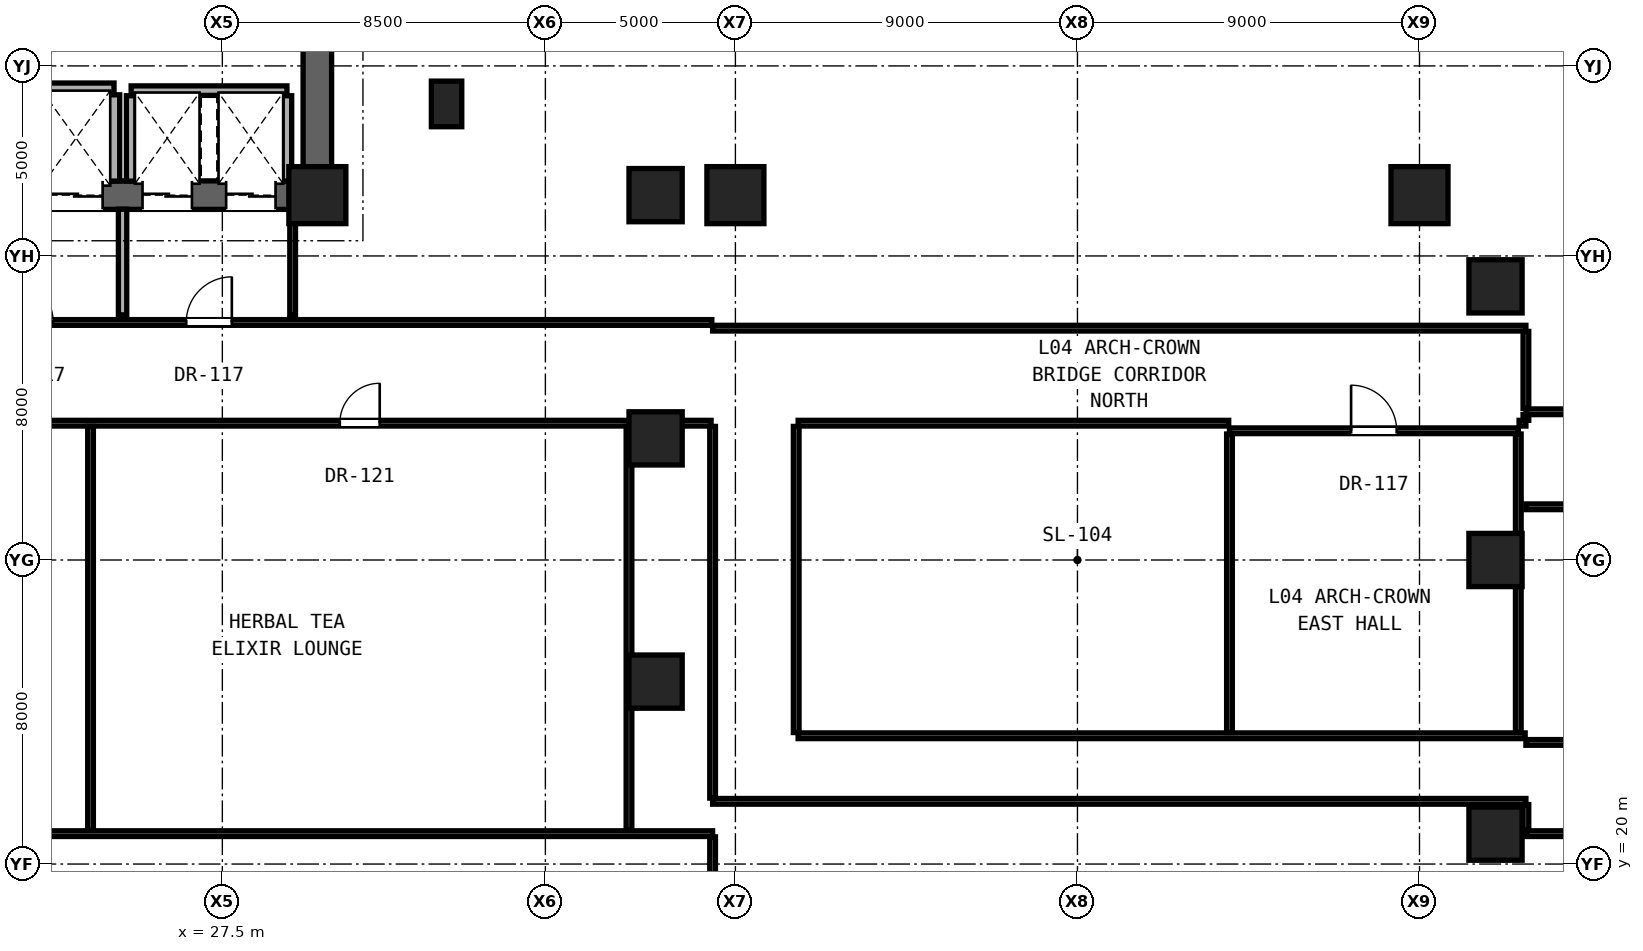
"""IFC4 building model, lengths in metres.
Left out: names, types, materials, properties, quantities, classifications, styles, units other than length and angle.
Written with IfcOpenShell. Run it as: python <this file> out.ifc"""

import sys

from ifc_helpers import new_model, si_unit, direction, frame, frame_2d, origin, origin_2d, place, context, subcontext, project, spatial, rectangle, hollow_rectangle, extrude, element, fill, save


model = new_model("IFC4")
c1 = context("Model", 3, precision=1e-05, world=origin(), true_north=direction((0.0, 1.0)))
c2 = subcontext(c1, "Body", "Model", "MODEL_VIEW")
j1 = project(units=[si_unit("LENGTHUNIT", "METRE"), si_unit("PLANEANGLEUNIT", "RADIAN")], contexts=[c1])
p1 = place(None, origin())
s1 = spatial("IfcSite", under=j1, at=p1, CompositionType="ELEMENT")
p2 = place(p1, origin())
s2 = spatial("IfcBuilding", under=s1, at=p2, CompositionType="ELEMENT")
p3 = place(p2, frame((0.0, 0.0, 18.1)))
s3 = spatial("IfcBuildingStorey", under=s2, at=p3, CompositionType="ELEMENT", Elevation=18.1)
p4 = place(p3, frame((30.0, 37.6, 0.0), z_axis=(0.0, 0.0, 1.0), x_axis=(1.0, 0.0, 0.0)))
e1 = element("IfcColumn", 1, at=p4, inside=s3, PredefinedType="COLUMN", context=c2, shape_type="SweptSolid", body=[
    extrude(rectangle(XDim=1.5, YDim=1.5, at=origin_2d()), origin(), (0.0, 0.0, 1.0), 4.3),
])
for number, where, z_axis, x_axis in (
    (2, (38.9, 24.8, 0.0), (0.0, 0.0, 1.0), (1.0, 0.0, 0.0)),
    (3, (38.9, 31.2, 0.0), (0.0, 0.0, 1.0), (1.0, 0.0, 0.0)),
    (4, (38.9, 37.6, 0.0), (0.0, 0.0, 1.0), (1.0, 0.0, 0.0)),
):
    element("IfcColumn", number, at=place(p3, frame(where, z_axis=z_axis, x_axis=x_axis)), inside=s3, PredefinedType="COLUMN", context=c2, shape_type="SweptSolid", body=[
        extrude(hollow_rectangle(XDim=1.4, YDim=1.4, WallThickness=0.08, at=origin_2d()), origin(), (0.0, 0.0, 1.0), 4.3),
    ])
p5 = place(p3, frame((33.4, 40.0, 0.0), z_axis=(0.0, 0.0, 1.0), x_axis=(1.0, 0.0, 0.0)))
e5 = element("IfcColumn", 5, at=p5, inside=s3, PredefinedType="PILASTER", context=c2, shape_type="SweptSolid", body=[
    extrude(rectangle(XDim=0.8, YDim=1.2, at=origin_2d()), origin(), (0.0, 0.0, 1.0), 4.3),
])
p6 = place(p3, frame((30.0, 37.6, 0.0), z_axis=(0.0, 0.0, 1.0), x_axis=(0.0, 1.0, 0.0)))
e6 = element("IfcWall", 6, at=p6, inside=s3, PredefinedType="SHEAR", context=c2, shape_type="SweptSolid", body=[
    extrude(rectangle(XDim=6.0, YDim=0.75, at=frame_2d((3.0, 0.0))), origin(), (0.0, 0.0, 1.0), 3.65),
])
p7 = place(p3, frame((11.0, 37.6, 0.0), z_axis=(0.0, 0.0, 1.0), x_axis=(1.0, 0.0, 0.0)))
e7 = element("IfcWall", 7, at=p7, inside=s3, PredefinedType="SHEAR", context=c2, shape_type="SweptSolid", body=[
    extrude(rectangle(XDim=19.0, YDim=0.75, at=frame_2d((9.5, 0.0))), origin(), (0.0, 0.0, 1.0), 3.65),
])
p8 = place(p7, frame((1.07, 0.0, 0.0)))
e8 = element("IfcOpeningElement", 8, at=p8, cuts=e7, PredefinedType="OPENING", context=c2, shape_type="SweptSolid", body=[
    extrude(rectangle(XDim=1.15, YDim=2.2, at=frame_2d((0.575, 1.1))), frame((0.0, 0.385, 0.0), z_axis=(0.0, -1.0, 0.0), x_axis=(1.0, 0.0, 0.0)), (0.0, 0.0, 1.0), 0.77),
])
p9 = place(p7, frame((9.55, 0.0, 0.0)))
e9 = element("IfcOpeningElement", 9, at=p9, cuts=e7, PredefinedType="OPENING", context=c2, shape_type="SweptSolid", body=[
    extrude(rectangle(XDim=1.4, YDim=2.35, at=frame_2d((0.7, 1.175))), frame((0.0, 0.385, 0.0), z_axis=(0.0, -1.0, 0.0), x_axis=(1.0, 0.0, 0.0)), (0.0, 0.0, 1.0), 0.77),
])
p10 = place(p7, frame((11.95, 0.0, 0.0)))
e10 = element("IfcOpeningElement", 10, at=p10, cuts=e7, PredefinedType="OPENING", context=c2, shape_type="SweptSolid", body=[
    extrude(rectangle(XDim=1.4, YDim=2.35, at=frame_2d((0.7, 1.175))), frame((0.0, 0.385, 0.0), z_axis=(0.0, -1.0, 0.0), x_axis=(1.0, 0.0, 0.0)), (0.0, 0.0, 1.0), 0.77),
])
p11 = place(p7, frame((14.4, 0.0, 0.0)))
e11 = element("IfcOpeningElement", 11, at=p11, cuts=e7, PredefinedType="OPENING", context=c2, shape_type="SweptSolid", body=[
    extrude(rectangle(XDim=1.3, YDim=2.3, at=frame_2d((0.65, 1.15))), frame((0.0, 0.385, 0.0), z_axis=(0.0, -1.0, 0.0), x_axis=(1.0, 0.0, 0.0)), (0.0, 0.0, 1.0), 0.77),
])
p12 = place(p7, frame((16.6, 0.0, 0.0)))
e12 = element("IfcOpeningElement", 12, at=p12, cuts=e7, PredefinedType="OPENING", context=c2, shape_type="SweptSolid", body=[
    extrude(rectangle(XDim=1.3, YDim=2.3, at=frame_2d((0.65, 1.15))), frame((0.0, 0.385, 0.0), z_axis=(0.0, -1.0, 0.0), x_axis=(1.0, 0.0, 0.0)), (0.0, 0.0, 1.0), 0.77),
])
for number, where, z_axis, x_axis in (
    (13, (61.0, 20.8, 0.0), (0.0, 0.0, 1.0), (1.0, 0.0, 0.0)),
    (14, (61.0, 28.0, 0.0), (0.0, 0.0, 1.0), (1.0, 0.0, 0.0)),
    (15, (61.0, 35.2, 0.0), (0.0, 0.0, 1.0), (1.0, 0.0, 0.0)),
):
    element("IfcColumn", number, at=place(p3, frame(where, z_axis=z_axis, x_axis=x_axis)), inside=s3, PredefinedType="COLUMN", context=c2, shape_type="SweptSolid", body=[
        extrude(hollow_rectangle(XDim=1.4, YDim=1.4, WallThickness=0.08, at=origin_2d()), origin(), (0.0, 0.0, 1.0), 4.3),
    ])
for number, where, z_axis, x_axis in (
    (16, (41.0, 37.6, 0.0), (0.0, 0.0, 1.0), (1.0, 0.0, 0.0)),
    (17, (59.0, 37.6, 0.0), (0.0, 0.0, 1.0), (1.0, 0.0, 0.0)),
):
    element("IfcColumn", number, at=place(p3, frame(where, z_axis=z_axis, x_axis=x_axis)), inside=s3, PredefinedType="COLUMN", context=c2, shape_type="SweptSolid", body=[
        extrude(rectangle(XDim=1.5, YDim=1.5, at=origin_2d()), origin(), (0.0, 0.0, 1.0), 4.3),
    ])
p13 = place(p3, frame((10.05, 20.8, 0.0), z_axis=(0.0, 0.0, 1.0), x_axis=(1.0, 0.0, 0.0)))
e18 = element("IfcWall", 18, at=p13, inside=s3, PredefinedType="PARTITIONING", context=c2, shape_type="SweptSolid", body=[
    extrude(rectangle(XDim=30.35, YDim=0.15, at=frame_2d((15.175, 0.0))), origin(), (0.0, 0.0, 1.0), 2.602),
])
p14 = place(p13, frame((0.995, 0.0, 0.0)))
e19 = element("IfcOpeningElement", 19, at=p14, cuts=e18, PredefinedType="OPENING", context=c2, shape_type="SweptSolid", body=[
    extrude(rectangle(XDim=0.9, YDim=2.1, at=frame_2d((0.45, 1.05))), frame((0.0, 0.085, 0.0), z_axis=(0.0, -1.0, 0.0), x_axis=(1.0, 0.0, 0.0)), (0.0, 0.0, 1.0), 0.17),
])
p15 = place(p13, frame((7.891, 0.0, 0.0)))
e20 = element("IfcOpeningElement", 20, at=p15, cuts=e18, PredefinedType="OPENING", context=c2, shape_type="SweptSolid", body=[
    extrude(rectangle(XDim=1.05, YDim=2.2, at=frame_2d((0.525, 1.1))), frame((0.0, 0.085, 0.0), z_axis=(0.0, -1.0, 0.0), x_axis=(1.0, 0.0, 0.0)), (0.0, 0.0, 1.0), 0.17),
])
p16 = place(p3, frame((61.8, 20.8, 0.0), z_axis=(0.0, 0.0, 1.0), x_axis=(1.0, 0.0, 0.0)))
e21 = element("IfcWall", 21, at=p16, inside=s3, PredefinedType="PARTITIONING", context=c2, shape_type="SweptSolid", body=[
    extrude(rectangle(XDim=5.83, YDim=0.15, at=frame_2d((2.915, 0.0))), origin(), (0.0, 0.0, 1.0), 2.542),
])
p17 = place(p3, frame((40.4, 21.65, 0.0), z_axis=(0.0, 0.0, 1.0), x_axis=(1.0, 0.0, 0.0)))
e22 = element("IfcWall", 22, at=p17, inside=s3, PredefinedType="PARTITIONING", context=c2, shape_type="SweptSolid", body=[
    extrude(rectangle(XDim=21.4, YDim=0.15, at=frame_2d((10.7, 0.0))), origin(), (0.0, 0.0, 1.0), 2.602),
])
p18 = place(p3, frame((61.8, 23.2, 0.0), z_axis=(0.0, 0.0, 1.0), x_axis=(1.0, 0.0, 0.0)))
e23 = element("IfcWall", 23, at=p18, inside=s3, PredefinedType="PARTITIONING", context=c2, shape_type="SweptSolid", body=[
    extrude(rectangle(XDim=29.15, YDim=0.15, at=frame_2d((14.575, 0.0))), origin(), (0.0, 0.0, 1.0), 2.715),
])
p19 = place(p18, frame((6.225, 0.0, 0.0)))
e24 = element("IfcOpeningElement", 24, at=p19, cuts=e23, PredefinedType="OPENING", context=c2, shape_type="SweptSolid", body=[
    extrude(rectangle(XDim=0.9, YDim=2.1, at=frame_2d((0.45, 1.05))), frame((0.0, 0.085, 0.0), z_axis=(0.0, -1.0, 0.0), x_axis=(1.0, 0.0, 0.0)), (0.0, 0.0, 1.0), 0.17),
])
p20 = place(p18, frame((15.15, 0.0, 0.0)))
e25 = element("IfcOpeningElement", 25, at=p20, cuts=e23, PredefinedType="OPENING", context=c2, shape_type="SweptSolid", body=[
    extrude(rectangle(XDim=1.05, YDim=2.2, at=frame_2d((0.525, 1.1))), frame((0.0, 0.085, 0.0), z_axis=(0.0, -1.0, 0.0), x_axis=(1.0, 0.0, 0.0)), (0.0, 0.0, 1.0), 0.17),
])
p21 = place(p3, frame((42.65, 23.375, 0.0), z_axis=(0.0, 0.0, 1.0), x_axis=(1.0, 0.0, 0.0)))
e26 = element("IfcWall", 26, at=p21, inside=s3, PredefinedType="PARTITIONING", context=c2, shape_type="SweptSolid", body=[
    extrude(rectangle(XDim=19.13, YDim=0.15, at=frame_2d((9.565, 0.0))), origin(), (0.0, 0.0, 1.0), 2.602),
])
p22 = place(p3, frame((61.8, 29.4, 0.0), z_axis=(0.0, 0.0, 1.0), x_axis=(1.0, 0.0, 0.0)))
e27 = element("IfcWall", 27, at=p22, inside=s3, PredefinedType="PARTITIONING", context=c2, shape_type="SweptSolid", body=[
    extrude(rectangle(XDim=7.93, YDim=0.15, at=frame_2d((3.965, 0.0))), origin(), (0.0, 0.0, 1.0), 2.715),
])
p23 = place(p3, frame((54.0, 31.4, 0.0), z_axis=(0.0, 0.0, 1.0), x_axis=(1.0, 0.0, 0.0)))
e28 = element("IfcWall", 28, at=p23, inside=s3, PredefinedType="PARTITIONING", context=c2, shape_type="SweptSolid", body=[
    extrude(rectangle(XDim=7.6, YDim=0.15, at=frame_2d((3.8, 0.0))), origin(), (0.0, 0.0, 1.0), 2.602),
])
p24 = place(p23, frame((3.2, 0.0, 0.0)))
e29 = element("IfcOpeningElement", 29, at=p24, cuts=e28, PredefinedType="OPENING", context=c2, shape_type="SweptSolid", body=[
    extrude(rectangle(XDim=1.2, YDim=2.25, at=frame_2d((0.6, 1.125))), frame((0.0, 0.085, 0.0), z_axis=(0.0, -1.0, 0.0), x_axis=(1.0, 0.0, 0.0)), (0.0, 0.0, 1.0), 0.17),
])
p25 = place(p3, frame((10.05, 31.6, 0.0), z_axis=(0.0, 0.0, 1.0), x_axis=(1.0, 0.0, 0.0)))
e30 = element("IfcWall", 30, at=p25, inside=s3, PredefinedType="PARTITIONING", context=c2, shape_type="SweptSolid", body=[
    extrude(rectangle(XDim=30.31, YDim=0.15, at=frame_2d((15.155, 0.0))), origin(), (0.0, 0.0, 1.0), 2.602),
])
p26 = place(p25, frame((20.541, 0.0, 0.0)))
e31 = element("IfcOpeningElement", 31, at=p26, cuts=e30, PredefinedType="OPENING", context=c2, shape_type="SweptSolid", body=[
    extrude(rectangle(XDim=1.05, YDim=2.2, at=frame_2d((0.525, 1.1))), frame((0.0, 0.085, 0.0), z_axis=(0.0, -1.0, 0.0), x_axis=(1.0, 0.0, 0.0)), (0.0, 0.0, 1.0), 0.17),
])
p27 = place(p3, frame((42.65, 31.6, 0.0), z_axis=(0.0, 0.0, 1.0), x_axis=(1.0, 0.0, 0.0)))
e32 = element("IfcWall", 32, at=p27, inside=s3, PredefinedType="PARTITIONING", context=c2, shape_type="SweptSolid", body=[
    extrude(rectangle(XDim=11.33, YDim=0.15, at=frame_2d((5.665, 0.0))), origin(), (0.0, 0.0, 1.0), 3.65),
])
p28 = place(p3, frame((61.62, 31.6, 0.0), z_axis=(0.0, 0.0, 1.0), x_axis=(1.0, 0.0, 0.0)))
e33 = element("IfcWall", 33, at=p28, inside=s3, PredefinedType="PARTITIONING", context=c2, shape_type="SweptSolid", body=[
    extrude(rectangle(XDim=0.18, YDim=0.15, at=frame_2d((0.09, 0.0))), origin(), (0.0, 0.0, 1.0), 3.65),
])
p29 = place(p3, frame((61.8, 31.9, 0.0), z_axis=(0.0, 0.0, 1.0), x_axis=(1.0, 0.0, 0.0)))
e34 = element("IfcWall", 34, at=p29, inside=s3, PredefinedType="PARTITIONING", context=c2, shape_type="SweptSolid", body=[
    extrude(rectangle(XDim=5.35, YDim=0.15, at=frame_2d((2.675, 0.0))), origin(), (0.0, 0.0, 1.0), 3.65),
])
p30 = place(p3, frame((40.4, 34.1, 0.0), z_axis=(0.0, 0.0, 1.0), x_axis=(1.0, 0.0, 0.0)))
e35 = element("IfcWall", 35, at=p30, inside=s3, PredefinedType="PARTITIONING", context=c2, shape_type="SweptSolid", body=[
    extrude(rectangle(XDim=21.4, YDim=0.15, at=frame_2d((10.7, 0.0))), origin(), (0.0, 0.0, 1.0), 2.602),
])
p31 = place(p3, frame((16.65, 34.25, 0.0), z_axis=(0.0, 0.0, 1.0), x_axis=(1.0, 0.0, 0.0)))
e36 = element("IfcWall", 36, at=p31, inside=s3, PredefinedType="PARTITIONING", context=c2, shape_type="SweptSolid", body=[
    extrude(rectangle(XDim=23.73, YDim=0.15, at=frame_2d((11.865, 0.0))), origin(), (0.0, 0.0, 1.0), 2.602),
])
p32 = place(p31, frame((5.2, 0.0, 0.0)))
e37 = element("IfcOpeningElement", 37, at=p32, cuts=e36, PredefinedType="OPENING", context=c2, shape_type="SweptSolid", body=[
    extrude(rectangle(XDim=1.2, YDim=2.25, at=frame_2d((0.6, 1.125))), frame((0.0, 0.085, 0.0), z_axis=(0.0, -1.0, 0.0), x_axis=(1.0, 0.0, 0.0)), (0.0, 0.0, 1.0), 0.17),
])
p33 = place(p31, frame((9.9, 0.0, 0.0)))
e38 = element("IfcOpeningElement", 38, at=p33, cuts=e36, PredefinedType="OPENING", context=c2, shape_type="SweptSolid", body=[
    extrude(rectangle(XDim=1.2, YDim=2.25, at=frame_2d((0.6, 1.125))), frame((0.0, 0.085, 0.0), z_axis=(0.0, -1.0, 0.0), x_axis=(1.0, 0.0, 0.0)), (0.0, 0.0, 1.0), 0.17),
])
p34 = place(p3, frame((25.1, 40.35, 0.0), z_axis=(0.0, 0.0, 1.0), x_axis=(1.0, 0.0, 0.0)))
e39 = element("IfcWall", 39, at=p34, inside=s3, PredefinedType="SOLIDWALL", context=c2, shape_type="SweptSolid", body=[
    extrude(rectangle(XDim=4.1, YDim=0.25, at=frame_2d((2.05, 0.0))), origin(), (0.0, 0.0, 1.0), 3.65),
])
p35 = place(p3, frame((20.25, 40.4, 0.0), z_axis=(0.0, 0.0, 1.0), x_axis=(1.0, 0.0, 0.0)))
e40 = element("IfcWall", 40, at=p35, inside=s3, PredefinedType="SOLIDWALL", context=c2, shape_type="SweptSolid", body=[
    extrude(rectangle(XDim=4.4, YDim=0.3, at=frame_2d((2.2, 0.0))), origin(), (0.0, 0.0, 1.0), 3.65),
])
p36 = place(p3, frame((24.032, 20.885, 0.0), z_axis=(0.0, 0.0, 1.0), x_axis=(0.0, 1.0, 0.0)))
e41 = element("IfcWall", 41, at=p36, inside=s3, PredefinedType="PARTITIONING", context=c2, shape_type="SweptSolid", body=[
    extrude(rectangle(XDim=10.63, YDim=0.15, at=frame_2d((5.315, 0.0))), origin(), (0.0, 0.0, 1.0), 2.602),
])
p37 = place(p3, frame((24.65, 37.97, 0.0), z_axis=(0.0, 0.0, 1.0), x_axis=(0.0, 1.0, 0.0)))
e42 = element("IfcWall", 42, at=p37, inside=s3, PredefinedType="SOLIDWALL", context=c2, shape_type="SweptSolid", body=[
    extrude(rectangle(XDim=2.27, YDim=0.3, at=frame_2d((1.135, 0.0))), origin(), (0.0, 0.0, 1.0), 3.65),
])
p38 = place(p3, frame((24.875, 34.45, 0.0), z_axis=(0.0, 0.0, 1.0), x_axis=(0.0, 1.0, 0.0)))
e43 = element("IfcWall", 43, at=p38, inside=s3, PredefinedType="SOLIDWALL", context=c2, shape_type="SweptSolid", body=[
    extrude(rectangle(XDim=2.78, YDim=0.22, at=frame_2d((1.39, 0.0))), origin(), (0.0, 0.0, 1.0), 3.65),
])
p39 = place(p3, frame((25.1, 37.97, 0.0), z_axis=(0.0, 0.0, 1.0), x_axis=(0.0, 1.0, 0.0)))
e44 = element("IfcWall", 44, at=p39, inside=s3, PredefinedType="SOLIDWALL", context=c2, shape_type="SweptSolid", body=[
    extrude(rectangle(XDim=2.245, YDim=0.25, at=frame_2d((1.123, 0.0))), origin(), (0.0, 0.0, 1.0), 3.65),
])
p40 = place(p3, frame((29.35, 34.45, 0.0), z_axis=(0.0, 0.0, 1.0), x_axis=(0.0, 1.0, 0.0)))
e45 = element("IfcWall", 45, at=p40, inside=s3, PredefinedType="PARTITIONING", context=c2, shape_type="SweptSolid", body=[
    extrude(rectangle(XDim=2.78, YDim=0.15, at=frame_2d((1.39, 0.0))), origin(), (0.0, 0.0, 1.0), 3.65),
])
p41 = place(p3, frame((29.2, 37.97, 0.0), z_axis=(0.0, 0.0, 1.0), x_axis=(0.0, 1.0, 0.0)))
e46 = element("IfcWall", 46, at=p41, inside=s3, PredefinedType="SOLIDWALL", context=c2, shape_type="SweptSolid", body=[
    extrude(rectangle(XDim=2.245, YDim=0.25, at=frame_2d((1.123, 0.0))), origin(), (0.0, 0.0, 1.0), 3.65),
])
p42 = place(p3, frame((38.2, 20.885, 0.0), z_axis=(0.0, 0.0, 1.0), x_axis=(0.0, 1.0, 0.0)))
e47 = element("IfcWall", 47, at=p42, inside=s3, PredefinedType="PARTITIONING", context=c2, shape_type="SweptSolid", body=[
    extrude(rectangle(XDim=10.63, YDim=0.15, at=frame_2d((5.315, 0.0))), origin(), (0.0, 0.0, 1.0), 2.869),
])
p43 = place(p3, frame((40.4, 18.485, 0.0), z_axis=(0.0, 0.0, 1.0), x_axis=(0.0, 1.0, 0.0)))
e48 = element("IfcWall", 48, at=p43, inside=s3, PredefinedType="PARTITIONING", context=c2, shape_type="SweptSolid", body=[
    extrude(rectangle(XDim=2.23, YDim=0.15, at=frame_2d((1.115, 0.0))), origin(), (0.0, 0.0, 1.0), 2.694),
])
p44 = place(p3, frame((40.4, 21.735, 0.0), z_axis=(0.0, 0.0, 1.0), x_axis=(0.0, 1.0, 0.0)))
e49 = element("IfcWall", 49, at=p44, inside=s3, PredefinedType="PARTITIONING", context=c2, shape_type="SweptSolid", body=[
    extrude(rectangle(XDim=9.78, YDim=0.15, at=frame_2d((4.89, 0.0))), origin(), (0.0, 0.0, 1.0), 3.65),
])
p45 = place(p3, frame((42.6, 23.46, 0.0), z_axis=(0.0, 0.0, 1.0), x_axis=(0.0, 1.0, 0.0)))
e50 = element("IfcWall", 50, at=p45, inside=s3, PredefinedType="PARTITIONING", context=c2, shape_type="SweptSolid", body=[
    extrude(rectangle(XDim=8.055, YDim=0.15, at=frame_2d((4.027, 0.0))), origin(), (0.0, 0.0, 1.0), 3.65),
])
p46 = place(p3, frame((54.0, 23.46, 0.0), z_axis=(0.0, 0.0, 1.0), x_axis=(0.0, 1.0, 0.0)))
e51 = element("IfcWall", 51, at=p46, inside=s3, PredefinedType="PARTITIONING", context=c2, shape_type="SweptSolid", body=[
    extrude(rectangle(XDim=7.855, YDim=0.15, at=frame_2d((3.927, 0.0))), origin(), (0.0, 0.0, 1.0), 3.65),
])
p47 = place(p3, frame((61.6, 23.46, 0.0), z_axis=(0.0, 0.0, 1.0), x_axis=(0.0, 1.0, 0.0)))
e52 = element("IfcWall", 52, at=p47, inside=s3, PredefinedType="PARTITIONING", context=c2, shape_type="SweptSolid", body=[
    extrude(rectangle(XDim=7.855, YDim=0.15, at=frame_2d((3.927, 0.0))), origin(), (0.0, 0.0, 1.0), 2.869),
])
p48 = place(p3, frame((61.8, 20.885, 0.0), z_axis=(0.0, 0.0, 1.0), x_axis=(0.0, 1.0, 0.0)))
e53 = element("IfcWall", 53, at=p48, inside=s3, PredefinedType="PARTITIONING", context=c2, shape_type="SweptSolid", body=[
    extrude(rectangle(XDim=0.68, YDim=0.15, at=frame_2d((0.34, 0.0))), origin(), (0.0, 0.0, 1.0), 2.542),
])
p49 = place(p3, frame((61.8, 31.675, 0.0), z_axis=(0.0, 0.0, 1.0), x_axis=(0.0, 1.0, 0.0)))
e54 = element("IfcWall", 54, at=p49, inside=s3, PredefinedType="PARTITIONING", context=c2, shape_type="SweptSolid", body=[
    extrude(rectangle(XDim=0.15, YDim=0.15, at=frame_2d((0.075, 0.0))), origin(), (0.0, 0.0, 1.0), 3.65),
])
p50 = place(p3, frame((61.8, 31.985, 0.0), z_axis=(0.0, 0.0, 1.0), x_axis=(0.0, 1.0, 0.0)))
e55 = element("IfcWall", 55, at=p50, inside=s3, PredefinedType="PARTITIONING", context=c2, shape_type="SweptSolid", body=[
    extrude(rectangle(XDim=2.03, YDim=0.15, at=frame_2d((1.015, 0.0))), origin(), (0.0, 0.0, 1.0), 3.65),
])
p51 = place(p32, origin())
e56 = element("IfcDoor", 56, at=p51, inside=s3, OperationType="SINGLE_SWING_LEFT", PredefinedType="DOOR", context=c2, shape_type="SweptSolid", body=[
    extrude(rectangle(XDim=1.2, YDim=2.25, at=frame_2d((0.6, 1.125))), frame((0.0, 0.025, 0.0), z_axis=(0.0, -1.0, 0.0), x_axis=(1.0, 0.0, 0.0)), (0.0, 0.0, 1.0), 0.05),
])
fill(e37, e56)
p52 = place(p33, origin())
e57 = element("IfcDoor", 57, at=p52, inside=s3, OperationType="SINGLE_SWING_RIGHT", PredefinedType="DOOR", context=c2, shape_type="SweptSolid", body=[
    extrude(rectangle(XDim=1.2, YDim=2.25, at=frame_2d((0.6, 1.125))), frame((0.0, 0.025, 0.0), z_axis=(0.0, -1.0, 0.0), x_axis=(1.0, 0.0, 0.0)), (0.0, 0.0, 1.0), 0.05),
])
fill(e38, e57)
p53 = place(p26, origin())
e58 = element("IfcDoor", 58, at=p53, inside=s3, OperationType="SINGLE_SWING_RIGHT", PredefinedType="DOOR", context=c2, shape_type="SweptSolid", body=[
    extrude(rectangle(XDim=1.05, YDim=2.2, at=frame_2d((0.525, 1.1))), frame((0.0, 0.025, 0.0), z_axis=(0.0, -1.0, 0.0), x_axis=(1.0, 0.0, 0.0)), (0.0, 0.0, 1.0), 0.05),
])
fill(e31, e58)
p54 = place(p24, origin())
e59 = element("IfcDoor", 59, at=p54, inside=s3, OperationType="SINGLE_SWING_LEFT", PredefinedType="DOOR", context=c2, shape_type="SweptSolid", body=[
    extrude(rectangle(XDim=1.2, YDim=2.25, at=frame_2d((0.6, 1.125))), frame((0.0, 0.025, 0.0), z_axis=(0.0, -1.0, 0.0), x_axis=(1.0, 0.0, 0.0)), (0.0, 0.0, 1.0), 0.05),
])
fill(e29, e59)
p55 = place(p10, origin())
e60 = element("IfcDoor", 60, at=p55, inside=s3, OperationType="DOUBLE_DOOR_SLIDING", PredefinedType="DOOR", context=c2, shape_type="SweptSolid", body=[
    extrude(rectangle(XDim=1.4, YDim=2.35, at=frame_2d((0.7, 1.175))), frame((0.0, 0.025, 0.0), z_axis=(0.0, -1.0, 0.0), x_axis=(1.0, 0.0, 0.0)), (0.0, 0.0, 1.0), 0.05),
])
fill(e10, e60)
p56 = place(p11, origin())
e61 = element("IfcDoor", 61, at=p56, inside=s3, OperationType="DOUBLE_DOOR_SLIDING", PredefinedType="DOOR", context=c2, shape_type="SweptSolid", body=[
    extrude(rectangle(XDim=1.3, YDim=2.3, at=frame_2d((0.65, 1.15))), frame((0.0, 0.025, 0.0), z_axis=(0.0, -1.0, 0.0), x_axis=(1.0, 0.0, 0.0)), (0.0, 0.0, 1.0), 0.05),
])
fill(e11, e61)
p57 = place(p12, origin())
e62 = element("IfcDoor", 62, at=p57, inside=s3, OperationType="DOUBLE_DOOR_SLIDING", PredefinedType="DOOR", context=c2, shape_type="SweptSolid", body=[
    extrude(rectangle(XDim=1.3, YDim=2.3, at=frame_2d((0.65, 1.15))), frame((0.0, 0.025, 0.0), z_axis=(0.0, -1.0, 0.0), x_axis=(1.0, 0.0, 0.0)), (0.0, 0.0, 1.0), 0.05),
])
fill(e12, e62)
save(model, sys.argv[1])
